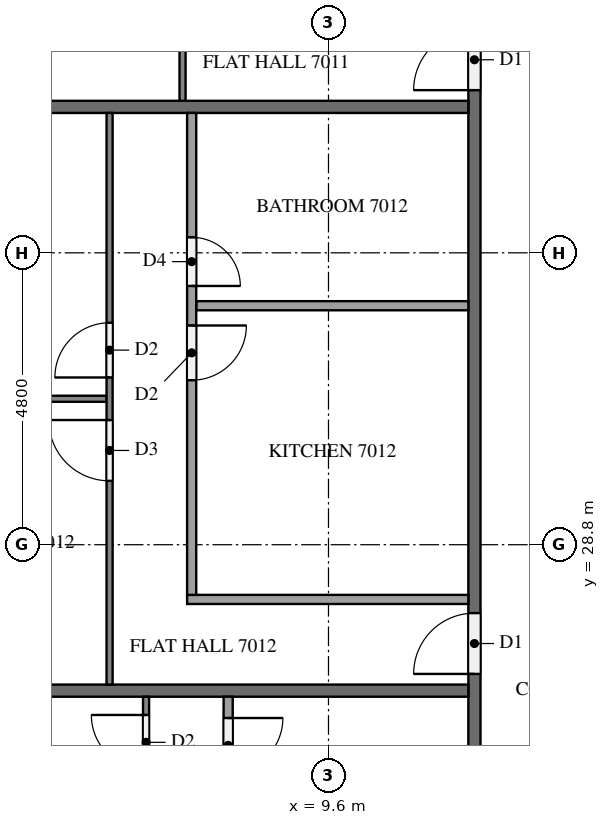
"""IFC4 building model, lengths in metres.
Left out: names, types, materials, properties, quantities, classifications, styles, units other than length and angle.
Written with IfcOpenShell. Run it as: python <this file> out.ifc"""

import sys

from ifc_helpers import new_model, si_unit, direction, frame, frame_2d, origin, place, context, subcontext, project, spatial, rectangle, extrude, element, fill, save


model = new_model("IFC4")
c1 = context("Model", 3, precision=1e-05, world=origin(), true_north=direction((0.0, 1.0)))
c2 = subcontext(c1, "Body", "Model", "MODEL_VIEW")
j1 = project(units=[si_unit("LENGTHUNIT", "METRE"), si_unit("PLANEANGLEUNIT", "RADIAN")], contexts=[c1])
p1 = place(None, origin())
s1 = spatial("IfcSite", under=j1, at=p1, CompositionType="ELEMENT")
p2 = place(p1, origin())
s2 = spatial("IfcBuilding", under=s1, at=p2, CompositionType="ELEMENT")
p3 = place(p2, frame((0.0, 0.0, 268.6)))
s3 = spatial("IfcBuildingStorey", under=s2, at=p3, CompositionType="ELEMENT", Elevation=268.6)
p4 = place(p3, frame((12.0, 12.1, 0.0), z_axis=(0.0, 0.0, 1.0), x_axis=(0.0, 1.0, 0.0)))
e1 = element("IfcWall", 1, at=p4, inside=s3, PredefinedType="PARTITIONING", context=c2, shape_type="SweptSolid", body=[
    extrude(rectangle(XDim=28.6, YDim=0.2, at=frame_2d((14.3, 0.0))), origin(), (0.0, 0.0, 1.0), 3.2),
])
p5 = place(p4, frame((24.175, 0.0, 0.0)))
e2 = element("IfcOpeningElement", 2, at=p5, cuts=e1, PredefinedType="OPENING", context=c2, shape_type="SweptSolid", body=[
    extrude(rectangle(XDim=1.0, YDim=2.1, at=frame_2d((0.5, 1.05))), frame((0.0, 0.11, 0.0), z_axis=(0.0, -1.0, 0.0), x_axis=(1.0, 0.0, 0.0)), (0.0, 0.0, 1.0), 0.22),
])
p6 = place(p4, frame((14.575, 0.0, 0.0)))
e3 = element("IfcOpeningElement", 3, at=p6, cuts=e1, PredefinedType="OPENING", context=c2, shape_type="SweptSolid", body=[
    extrude(rectangle(XDim=1.0, YDim=2.1, at=frame_2d((0.5, 1.05))), frame((0.0, 0.11, 0.0), z_axis=(0.0, -1.0, 0.0), x_axis=(1.0, 0.0, 0.0)), (0.0, 0.0, 1.0), 0.22),
])
p7 = place(p4, frame((0.175, 0.0, 0.0)))
e4 = element("IfcOpeningElement", 4, at=p7, cuts=e1, PredefinedType="OPENING", context=c2, shape_type="SweptSolid", body=[
    extrude(rectangle(XDim=1.0, YDim=2.1, at=frame_2d((0.5, 1.05))), frame((0.0, 0.11, 0.0), z_axis=(0.0, -1.0, 0.0), x_axis=(1.0, 0.0, 0.0)), (0.0, 0.0, 1.0), 0.22),
])
for number, where, z_axis, x_axis in (
    (5, (0.1, 36.0, 0.0), (0.0, 0.0, 1.0), (1.0, 0.0, 0.0)),
    (6, (0.1, 26.4, 0.0), (0.0, 0.0, 1.0), (1.0, 0.0, 0.0)),
):
    element("IfcWall", number, at=place(p3, frame(where, z_axis=z_axis, x_axis=x_axis)), inside=s3, PredefinedType="PARTITIONING", context=c2, shape_type="SweptSolid", body=[
        extrude(rectangle(XDim=11.8, YDim=0.2, at=frame_2d((5.9, 0.0))), origin(), (0.0, 0.0, 1.0), 3.2),
    ])
p8 = place(p3, frame((7.2, 36.1, 0.0), z_axis=(0.0, 0.0, 1.0), x_axis=(0.0, 1.0, 0.0)))
e7 = element("IfcWall", 7, at=p8, inside=s3, PredefinedType="PARTITIONING", context=c2, shape_type="SweptSolid", body=[
    extrude(rectangle(XDim=11.8, YDim=0.1, at=frame_2d((5.9, 0.0))), origin(), (0.0, 0.0, 1.0), 3.2),
])
p9 = place(p8, frame((5.75, 0.0, 0.0)))
e8 = element("IfcOpeningElement", 8, at=p9, cuts=e7, PredefinedType="OPENING", context=c2, shape_type="SweptSolid", body=[
    extrude(rectangle(XDim=1.0, YDim=2.1, at=frame_2d((0.5, 1.05))), frame((0.0, 0.06, 0.0), z_axis=(0.0, -1.0, 0.0), x_axis=(1.0, 0.0, 0.0)), (0.0, 0.0, 1.0), 0.12),
])
p10 = place(p8, frame((7.45, 0.0, 0.0)))
e9 = element("IfcOpeningElement", 9, at=p10, cuts=e7, PredefinedType="OPENING", context=c2, shape_type="SweptSolid", body=[
    extrude(rectangle(XDim=0.9, YDim=2.1, at=frame_2d((0.45, 1.05))), frame((0.0, 0.06, 0.0), z_axis=(0.0, -1.0, 0.0), x_axis=(1.0, 0.0, 0.0)), (0.0, 0.0, 1.0), 0.12),
])
p11 = place(p3, frame((5.95, 31.2, 0.0), z_axis=(0.0, 0.0, 1.0), x_axis=(-1.0, 0.0, 0.0)))
e10 = element("IfcWall", 10, at=p11, inside=s3, PredefinedType="PARTITIONING", context=c2, shape_type="SweptSolid", body=[
    extrude(rectangle(XDim=5.85, YDim=0.1, at=frame_2d((2.925, 0.0))), origin(), (0.0, 0.0, 1.0), 3.2),
])
p12 = place(p3, frame((6.0, 26.5, 0.0), z_axis=(0.0, 0.0, 1.0), x_axis=(0.0, 1.0, 0.0)))
e11 = element("IfcWall", 11, at=p12, inside=s3, PredefinedType="PARTITIONING", context=c2, shape_type="SweptSolid", body=[
    extrude(rectangle(XDim=9.4, YDim=0.1, at=frame_2d((4.7, 0.0))), origin(), (0.0, 0.0, 1.0), 3.2),
])
p13 = place(p12, frame((3.35, 0.0, 0.0)))
e12 = element("IfcOpeningElement", 12, at=p13, cuts=e11, PredefinedType="OPENING", context=c2, shape_type="SweptSolid", body=[
    extrude(rectangle(XDim=1.0, YDim=2.1, at=frame_2d((0.5, 1.05))), frame((0.0, 0.06, 0.0), z_axis=(0.0, -1.0, 0.0), x_axis=(1.0, 0.0, 0.0)), (0.0, 0.0, 1.0), 0.12),
])
p14 = place(p12, frame((5.05, 0.0, 0.0)))
e13 = element("IfcOpeningElement", 13, at=p14, cuts=e11, PredefinedType="OPENING", context=c2, shape_type="SweptSolid", body=[
    extrude(rectangle(XDim=0.9, YDim=2.1, at=frame_2d((0.45, 1.05))), frame((0.0, 0.06, 0.0), z_axis=(0.0, -1.0, 0.0), x_axis=(1.0, 0.0, 0.0)), (0.0, 0.0, 1.0), 0.12),
])
p15 = place(p3, frame((11.9, 32.73, 0.0), z_axis=(0.0, 0.0, 1.0), x_axis=(-1.0, 0.0, 0.0)))
e14 = element("IfcWall", 14, at=p15, inside=s3, PredefinedType="PARTITIONING", context=c2, shape_type="SweptSolid", body=[
    extrude(rectangle(XDim=4.475, YDim=0.15, at=frame_2d((2.237, 0.0))), origin(), (0.0, 0.0, 1.0), 3.2),
])
p16 = place(p3, frame((11.9, 27.9, 0.0), z_axis=(0.0, 0.0, 1.0), x_axis=(-1.0, 0.0, 0.0)))
e15 = element("IfcWall", 15, at=p16, inside=s3, PredefinedType="PARTITIONING", context=c2, shape_type="SweptSolid", body=[
    extrude(rectangle(XDim=4.625, YDim=0.15, at=frame_2d((2.312, 0.0))), origin(), (0.0, 0.0, 1.0), 3.2),
])
p17 = place(p3, frame((7.35, 35.9, 0.0), z_axis=(0.0, 0.0, 1.0), x_axis=(0.0, -1.0, 0.0)))
e16 = element("IfcWall", 16, at=p17, inside=s3, PredefinedType="PARTITIONING", context=c2, shape_type="SweptSolid", body=[
    extrude(rectangle(XDim=7.925, YDim=0.15, at=frame_2d((3.962, 0.0))), origin(), (0.0, 0.0, 1.0), 3.2),
])
p18 = place(p17, frame((3.495, 0.0, 0.0)))
e17 = element("IfcOpeningElement", 17, at=p18, cuts=e16, PredefinedType="OPENING", context=c2, shape_type="SweptSolid", body=[
    extrude(rectangle(XDim=0.9, YDim=2.1, at=frame_2d((0.45, 1.05))), frame((0.0, 0.085, 0.0), z_axis=(0.0, -1.0, 0.0), x_axis=(1.0, 0.0, 0.0)), (0.0, 0.0, 1.0), 0.17),
])
p19 = place(p17, frame((2.045, 0.0, 0.0)))
e18 = element("IfcOpeningElement", 18, at=p19, cuts=e16, PredefinedType="OPENING", context=c2, shape_type="SweptSolid", body=[
    extrude(rectangle(XDim=0.8, YDim=2.1, at=frame_2d((0.4, 1.05))), frame((0.0, 0.085, 0.0), z_axis=(0.0, -1.0, 0.0), x_axis=(1.0, 0.0, 0.0)), (0.0, 0.0, 1.0), 0.17),
])
p20 = place(p3, frame((6.6, 12.1, 0.0), z_axis=(0.0, 0.0, 1.0), x_axis=(0.0, 1.0, 0.0)))
e19 = element("IfcWall", 19, at=p20, inside=s3, PredefinedType="PARTITIONING", context=c2, shape_type="SweptSolid", body=[
    extrude(rectangle(XDim=14.2, YDim=0.1, at=frame_2d((7.1, 0.0))), origin(), (0.0, 0.0, 1.0), 3.2),
])
p21 = place(p20, frame((3.35, 0.0, 0.0)))
e20 = element("IfcOpeningElement", 20, at=p21, cuts=e19, PredefinedType="OPENING", context=c2, shape_type="SweptSolid", body=[
    extrude(rectangle(XDim=1.0, YDim=2.1, at=frame_2d((0.5, 1.05))), frame((0.0, 0.06, 0.0), z_axis=(0.0, -1.0, 0.0), x_axis=(1.0, 0.0, 0.0)), (0.0, 0.0, 1.0), 0.12),
])
p22 = place(p20, frame((5.05, 0.0, 0.0)))
e21 = element("IfcOpeningElement", 21, at=p22, cuts=e19, PredefinedType="OPENING", context=c2, shape_type="SweptSolid", body=[
    extrude(rectangle(XDim=0.9, YDim=2.1, at=frame_2d((0.45, 1.05))), frame((0.0, 0.06, 0.0), z_axis=(0.0, -1.0, 0.0), x_axis=(1.0, 0.0, 0.0)), (0.0, 0.0, 1.0), 0.12),
])
p23 = place(p20, frame((13.0, 0.0, 0.0)))
e22 = element("IfcOpeningElement", 22, at=p23, cuts=e19, PredefinedType="OPENING", context=c2, shape_type="SweptSolid", body=[
    extrude(rectangle(XDim=0.9, YDim=2.1, at=frame_2d((0.45, 1.05))), frame((0.0, 0.06, 0.0), z_axis=(0.0, -1.0, 0.0), x_axis=(1.0, 0.0, 0.0)), (0.0, 0.0, 1.0), 0.12),
])
p24 = place(p3, frame((7.95, 26.3, 0.0), z_axis=(0.0, 0.0, 1.0), x_axis=(0.0, -1.0, 0.0)))
e23 = element("IfcWall", 23, at=p24, inside=s3, PredefinedType="PARTITIONING", context=c2, shape_type="SweptSolid", body=[
    extrude(rectangle(XDim=12.725, YDim=0.15, at=frame_2d((6.363, 0.0))), origin(), (0.0, 0.0, 1.0), 3.2),
])
p25 = place(p24, frame((9.135, 0.0, 0.0)))
e24 = element("IfcOpeningElement", 24, at=p25, cuts=e23, PredefinedType="OPENING", context=c2, shape_type="SweptSolid", body=[
    extrude(rectangle(XDim=0.9, YDim=2.1, at=frame_2d((0.45, 1.05))), frame((0.0, 0.085, 0.0), z_axis=(0.0, -1.0, 0.0), x_axis=(1.0, 0.0, 0.0)), (0.0, 0.0, 1.0), 0.17),
])
p26 = place(p24, frame((7.685, 0.0, 0.0)))
e25 = element("IfcOpeningElement", 25, at=p26, cuts=e23, PredefinedType="OPENING", context=c2, shape_type="SweptSolid", body=[
    extrude(rectangle(XDim=0.8, YDim=2.1, at=frame_2d((0.4, 1.05))), frame((0.0, 0.085, 0.0), z_axis=(0.0, -1.0, 0.0), x_axis=(1.0, 0.0, 0.0)), (0.0, 0.0, 1.0), 0.17),
])
p27 = place(p24, frame((0.35, 0.0, 0.0)))
e26 = element("IfcOpeningElement", 26, at=p27, cuts=e23, PredefinedType="OPENING", context=c2, shape_type="SweptSolid", body=[
    extrude(rectangle(XDim=0.9, YDim=2.1, at=frame_2d((0.45, 1.05))), frame((0.0, 0.085, 0.0), z_axis=(0.0, -1.0, 0.0), x_axis=(1.0, 0.0, 0.0)), (0.0, 0.0, 1.0), 0.17),
])
p28 = place(p5, origin())
e27 = element("IfcDoor", 27, at=p28, inside=s3, OperationType="SINGLE_SWING_LEFT", PredefinedType="DOOR", context=c2, shape_type="SweptSolid", body=[
    extrude(rectangle(XDim=1.0, YDim=2.1, at=frame_2d((0.5, 1.05))), frame((0.0, 0.025, 0.0), z_axis=(0.0, -1.0, 0.0), x_axis=(1.0, 0.0, 0.0)), (0.0, 0.0, 1.0), 0.05),
])
fill(e2, e27)
p29 = place(p6, origin())
e28 = element("IfcDoor", 28, at=p29, inside=s3, OperationType="SINGLE_SWING_LEFT", PredefinedType="DOOR", context=c2, shape_type="SweptSolid", body=[
    extrude(rectangle(XDim=1.0, YDim=2.1, at=frame_2d((0.5, 1.05))), frame((0.0, 0.025, 0.0), z_axis=(0.0, -1.0, 0.0), x_axis=(1.0, 0.0, 0.0)), (0.0, 0.0, 1.0), 0.05),
])
fill(e3, e28)
p30 = place(p13, origin())
e29 = element("IfcDoor", 29, at=p30, inside=s3, OperationType="SINGLE_SWING_RIGHT", PredefinedType="DOOR", context=c2, shape_type="SweptSolid", body=[
    extrude(rectangle(XDim=1.0, YDim=2.1, at=frame_2d((0.5, 1.05))), frame((0.0, 0.025, 0.0), z_axis=(0.0, -1.0, 0.0), x_axis=(1.0, 0.0, 0.0)), (0.0, 0.0, 1.0), 0.05),
])
fill(e12, e29)
p31 = place(p14, origin())
e30 = element("IfcDoor", 30, at=p31, inside=s3, OperationType="SINGLE_SWING_LEFT", PredefinedType="DOOR", context=c2, shape_type="SweptSolid", body=[
    extrude(rectangle(XDim=0.9, YDim=2.1, at=frame_2d((0.45, 1.05))), frame((0.0, 0.025, 0.0), z_axis=(0.0, -1.0, 0.0), x_axis=(1.0, 0.0, 0.0)), (0.0, 0.0, 1.0), 0.05),
])
fill(e13, e30)
p32 = place(p18, origin())
e31 = element("IfcDoor", 31, at=p32, inside=s3, OperationType="SINGLE_SWING_LEFT", PredefinedType="DOOR", context=c2, shape_type="SweptSolid", body=[
    extrude(rectangle(XDim=0.9, YDim=2.1, at=frame_2d((0.45, 1.05))), frame((0.0, 0.025, 0.0), z_axis=(0.0, -1.0, 0.0), x_axis=(1.0, 0.0, 0.0)), (0.0, 0.0, 1.0), 0.05),
])
fill(e17, e31)
p33 = place(p19, origin())
e32 = element("IfcDoor", 32, at=p33, inside=s3, OperationType="SINGLE_SWING_RIGHT", PredefinedType="DOOR", context=c2, shape_type="SweptSolid", body=[
    extrude(rectangle(XDim=0.8, YDim=2.1, at=frame_2d((0.4, 1.05))), frame((0.0, 0.025, 0.0), z_axis=(0.0, -1.0, 0.0), x_axis=(1.0, 0.0, 0.0)), (0.0, 0.0, 1.0), 0.05),
])
fill(e18, e32)
p34 = place(p23, origin())
e33 = element("IfcDoor", 33, at=p34, inside=s3, OperationType="SINGLE_SWING_RIGHT", PredefinedType="DOOR", context=c2, shape_type="SweptSolid", body=[
    extrude(rectangle(XDim=0.9, YDim=2.1, at=frame_2d((0.45, 1.05))), frame((0.0, 0.025, 0.0), z_axis=(0.0, -1.0, 0.0), x_axis=(1.0, 0.0, 0.0)), (0.0, 0.0, 1.0), 0.05),
])
fill(e22, e33)
p35 = place(p27, origin())
e34 = element("IfcDoor", 34, at=p35, inside=s3, OperationType="SINGLE_SWING_LEFT", PredefinedType="DOOR", context=c2, shape_type="SweptSolid", body=[
    extrude(rectangle(XDim=0.9, YDim=2.1, at=frame_2d((0.45, 1.05))), frame((0.0, 0.025, 0.0), z_axis=(0.0, -1.0, 0.0), x_axis=(1.0, 0.0, 0.0)), (0.0, 0.0, 1.0), 0.05),
])
fill(e26, e34)
save(model, sys.argv[1])
